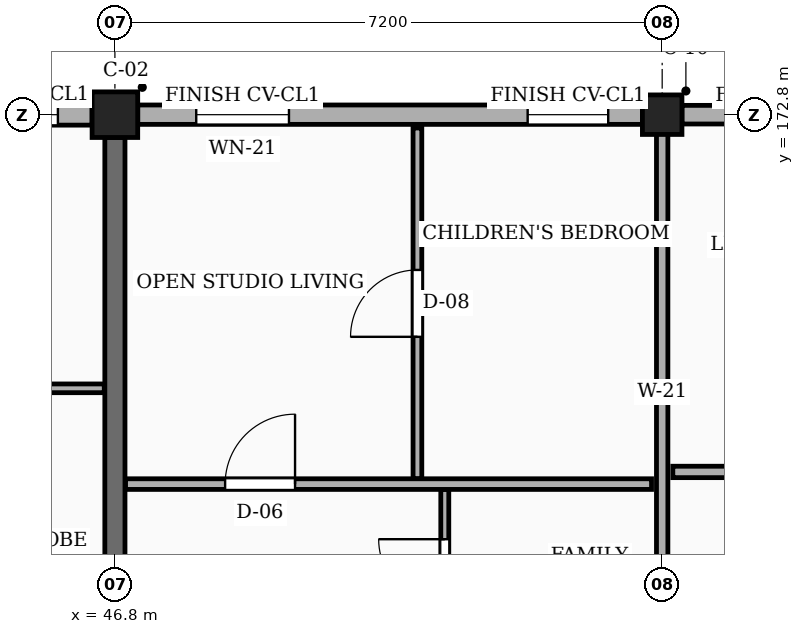
"""IFC4 building model, lengths in metres.
Left out: names, types, materials, properties, quantities, classifications, styles, units other than length and angle.
Written with IfcOpenShell. Run it as: python <this file> out.ifc"""

import sys

from ifc_helpers import new_model, si_unit, direction, frame, frame_2d, origin, origin_2d, place, context, subcontext, project, spatial, rectangle, circle, extrude, element, fill, save


model = new_model("IFC4")
c1 = context("Model", 3, precision=1e-05, world=origin(), true_north=direction((0.0, 1.0)))
c2 = subcontext(c1, "Body", "Model", "MODEL_VIEW")
j1 = project(units=[si_unit("LENGTHUNIT", "METRE"), si_unit("PLANEANGLEUNIT", "RADIAN")], contexts=[c1])
p1 = place(None, origin())
s1 = spatial("IfcSite", under=j1, at=p1, CompositionType="ELEMENT")
p2 = place(p1, origin())
s2 = spatial("IfcBuilding", under=s1, at=p2, CompositionType="ELEMENT")
p3 = place(p2, origin())
s3 = spatial("IfcBuildingStorey", under=s2, at=p3, CompositionType="ELEMENT", Elevation=0.0)
p4 = place(p3, frame((46.8, 172.8, 0.0), z_axis=(0.0, 0.0, 1.0), x_axis=(1.0, 0.0, 0.0)))
e1 = element("IfcColumn", 1, at=p4, inside=s3, PredefinedType="COLUMN", context=c2, shape_type="SweptSolid", body=[
    extrude(rectangle(XDim=0.6, YDim=0.6, at=origin_2d()), origin(), (0.0, 0.0, 1.0), 4.5),
])
p5 = place(p3, frame((54.0, 172.8, 0.0), z_axis=(0.0, 0.0, 1.0), x_axis=(1.0, 0.0, 0.0)))
e2 = element("IfcColumn", 2, at=p5, inside=s3, PredefinedType="COLUMN", context=c2, shape_type="SweptSolid", body=[
    extrude(circle(Radius=0.26, at=origin_2d()), origin(), (0.0, 0.0, 1.0), 4.5),
])
p6 = place(p3, frame((46.8, 165.925, 0.0), z_axis=(0.0, 0.0, 1.0), x_axis=(0.0, 1.0, 0.0)))
e3 = element("IfcWall", 3, at=p6, inside=s3, PredefinedType="SOLIDWALL", context=c2, shape_type="SweptSolid", body=[
    extrude(rectangle(XDim=6.575, YDim=0.265, at=frame_2d((3.288, 0.0))), origin(), (0.0, 0.0, 1.0), 3.535),
])
p7 = place(p3, frame((60.9, 172.8, 0.0), z_axis=(0.0, 0.0, 1.0), x_axis=(-1.0, 0.0, 0.0)))
e4 = element("IfcWall", 4, at=p7, inside=s3, PredefinedType="SOLIDWALL", context=c2, shape_type="SweptSolid", body=[
    extrude(rectangle(XDim=6.64, YDim=0.245, at=frame_2d((3.32, 0.0))), origin(), (0.0, 0.0, 1.0), 3.805),
])
p8 = place(p7, frame((0.45, 0.0, 0.78)))
e5 = element("IfcOpeningElement", 5, at=p8, cuts=e4, PredefinedType="OPENING", context=c2, shape_type="SweptSolid", body=[
    extrude(rectangle(XDim=0.9, YDim=1.36, at=frame_2d((0.45, 0.68))), frame((0.0, 0.133, 0.0), z_axis=(0.0, -1.0, 0.0), x_axis=(1.0, 0.0, 0.0)), (0.0, 0.0, 1.0), 0.265),
])
p9 = place(p7, frame((4.65, 0.0, 0.78)))
e6 = element("IfcOpeningElement", 6, at=p9, cuts=e4, PredefinedType="OPENING", context=c2, shape_type="SweptSolid", body=[
    extrude(rectangle(XDim=1.06, YDim=1.36, at=frame_2d((0.53, 0.68))), frame((0.0, 0.133, 0.0), z_axis=(0.0, -1.0, 0.0), x_axis=(1.0, 0.0, 0.0)), (0.0, 0.0, 1.0), 0.265),
])
p10 = place(p3, frame((53.74, 172.8, 0.0), z_axis=(0.0, 0.0, 1.0), x_axis=(-1.0, 0.0, 0.0)))
e7 = element("IfcWall", 7, at=p10, inside=s3, PredefinedType="SOLIDWALL", context=c2, shape_type="SweptSolid", body=[
    extrude(rectangle(XDim=6.64, YDim=0.255, at=frame_2d((3.32, 0.0))), origin(), (0.0, 0.0, 1.0), 3.805),
])
p11 = place(p10, frame((0.45, 0.0, 0.78)))
e8 = element("IfcOpeningElement", 8, at=p11, cuts=e7, PredefinedType="OPENING", context=c2, shape_type="SweptSolid", body=[
    extrude(rectangle(XDim=1.06, YDim=1.36, at=frame_2d((0.53, 0.68))), frame((0.0, 0.137, 0.0), z_axis=(0.0, -1.0, 0.0), x_axis=(1.0, 0.0, 0.0)), (0.0, 0.0, 1.0), 0.275),
])
p12 = place(p10, frame((4.65, 0.0, 0.78)))
e9 = element("IfcOpeningElement", 9, at=p12, cuts=e7, PredefinedType="OPENING", context=c2, shape_type="SweptSolid", body=[
    extrude(rectangle(XDim=1.22, YDim=1.36, at=frame_2d((0.61, 0.68))), frame((0.0, 0.137, 0.0), z_axis=(0.0, -1.0, 0.0), x_axis=(1.0, 0.0, 0.0)), (0.0, 0.0, 1.0), 0.275),
])
p13 = place(p3, frame((46.5, 172.8, 0.0), z_axis=(0.0, 0.0, 1.0), x_axis=(-1.0, 0.0, 0.0)))
e10 = element("IfcWall", 10, at=p13, inside=s3, PredefinedType="SOLIDWALL", context=c2, shape_type="SweptSolid", body=[
    extrude(rectangle(XDim=6.6, YDim=0.275, at=frame_2d((3.3, 0.0))), origin(), (0.0, 0.0, 1.0), 3.805),
])
p14 = place(p13, frame((0.45, 0.0, 0.78)))
e11 = element("IfcOpeningElement", 11, at=p14, cuts=e10, PredefinedType="OPENING", context=c2, shape_type="SweptSolid", body=[
    extrude(rectangle(XDim=1.22, YDim=1.36, at=frame_2d((0.61, 0.68))), frame((0.0, 0.147, 0.0), z_axis=(0.0, -1.0, 0.0), x_axis=(1.0, 0.0, 0.0)), (0.0, 0.0, 1.0), 0.295),
])
p15 = place(p13, frame((4.65, 0.0, 0.78)))
e12 = element("IfcOpeningElement", 12, at=p15, cuts=e10, PredefinedType="OPENING", context=c2, shape_type="SweptSolid", body=[
    extrude(rectangle(XDim=1.38, YDim=1.36, at=frame_2d((0.69, 0.68))), frame((0.0, 0.147, 0.0), z_axis=(0.0, -1.0, 0.0), x_axis=(1.0, 0.0, 0.0)), (0.0, 0.0, 1.0), 0.295),
])
p16 = place(p3, frame((54.0, 165.69, 0.0), z_axis=(0.0, 0.0, 1.0), x_axis=(0.0, 1.0, 0.0)))
e13 = element("IfcWall", 13, at=p16, inside=s3, PredefinedType="PARTITIONING", context=c2, shape_type="SweptSolid", body=[
    extrude(rectangle(XDim=6.935, YDim=0.15, at=frame_2d((3.468, 0.0))), origin(), (0.0, 0.0, 1.0), 3.485),
])
p17 = place(p3, frame((39.74, 169.2, 0.0), z_axis=(0.0, 0.0, 1.0), x_axis=(1.0, 0.0, 0.0)))
e14 = element("IfcWall", 14, at=p17, inside=s3, PredefinedType="PARTITIONING", context=c2, shape_type="SweptSolid", body=[
    extrude(rectangle(XDim=6.92, YDim=0.115, at=frame_2d((3.46, 0.0))), origin(), (0.0, 0.0, 1.0), 3.67),
])
p18 = place(p17, frame((1.05, 0.0, 0.0)))
e15 = element("IfcOpeningElement", 15, at=p18, cuts=e14, PredefinedType="OPENING", context=c2, shape_type="SweptSolid", body=[
    extrude(rectangle(XDim=0.87, YDim=2.05, at=frame_2d((0.435, 1.025))), frame((0.0, 0.067, 0.0), z_axis=(0.0, -1.0, 0.0), x_axis=(1.0, 0.0, 0.0)), (0.0, 0.0, 1.0), 0.135),
])
p19 = place(p17, frame((4.45, 0.0, 0.0)))
e16 = element("IfcOpeningElement", 16, at=p19, cuts=e14, PredefinedType="OPENING", context=c2, shape_type="SweptSolid", body=[
    extrude(rectangle(XDim=0.88, YDim=2.08, at=frame_2d((0.44, 1.04))), frame((0.0, 0.067, 0.0), z_axis=(0.0, -1.0, 0.0), x_axis=(1.0, 0.0, 0.0)), (0.0, 0.0, 1.0), 0.135),
])
p20 = place(p3, frame((50.78, 168.01, 0.0), z_axis=(0.0, 0.0, 1.0), x_axis=(0.0, 1.0, 0.0)))
e17 = element("IfcWall", 17, at=p20, inside=s3, PredefinedType="PARTITIONING", context=c2, shape_type="SweptSolid", body=[
    extrude(rectangle(XDim=4.615, YDim=0.115, at=frame_2d((2.308, 0.0))), origin(), (0.0, 0.0, 1.0), 3.67),
])
p21 = place(p20, frame((1.867, 0.0, 0.0)))
e18 = element("IfcOpeningElement", 18, at=p21, cuts=e17, PredefinedType="OPENING", context=c2, shape_type="SweptSolid", body=[
    extrude(rectangle(XDim=0.88, YDim=2.08, at=frame_2d((0.44, 1.04))), frame((0.0, 0.067, 0.0), z_axis=(0.0, -1.0, 0.0), x_axis=(1.0, 0.0, 0.0)), (0.0, 0.0, 1.0), 0.135),
])
p22 = place(p3, frame((51.14, 165.69, 0.0), z_axis=(0.0, 0.0, 1.0), x_axis=(0.0, 1.0, 0.0)))
e19 = element("IfcWall", 19, at=p22, inside=s3, PredefinedType="PARTITIONING", context=c2, shape_type="SweptSolid", body=[
    extrude(rectangle(XDim=2.18, YDim=0.105, at=frame_2d((1.09, 0.0))), origin(), (0.0, 0.0, 1.0), 3.67),
])
p23 = place(p22, frame((0.655, 0.0, 0.0)))
e20 = element("IfcOpeningElement", 20, at=p23, cuts=e19, PredefinedType="OPENING", context=c2, shape_type="SweptSolid", body=[
    extrude(rectangle(XDim=0.87, YDim=2.05, at=frame_2d((0.435, 1.025))), frame((0.0, 0.062, 0.0), z_axis=(0.0, -1.0, 0.0), x_axis=(1.0, 0.0, 0.0)), (0.0, 0.0, 1.0), 0.125),
])
p24 = place(p3, frame((46.94, 167.94, 0.0), z_axis=(0.0, 0.0, 1.0), x_axis=(1.0, 0.0, 0.0)))
e21 = element("IfcWall", 21, at=p24, inside=s3, PredefinedType="PARTITIONING", context=c2, shape_type="SweptSolid", body=[
    extrude(rectangle(XDim=6.92, YDim=0.14, at=frame_2d((3.46, 0.0))), origin(), (0.0, 0.0, 1.0), 3.67),
])
p25 = place(p24, frame((1.31, 0.0, 0.0)))
e22 = element("IfcOpeningElement", 22, at=p25, cuts=e21, PredefinedType="OPENING", context=c2, shape_type="SweptSolid", body=[
    extrude(rectangle(XDim=0.92, YDim=2.1, at=frame_2d((0.46, 1.05))), frame((0.0, 0.08, 0.0), z_axis=(0.0, -1.0, 0.0), x_axis=(1.0, 0.0, 0.0)), (0.0, 0.0, 1.0), 0.16),
])
p26 = place(p3, frame((54.14, 168.1, 0.0), z_axis=(0.0, 0.0, 1.0), x_axis=(1.0, 0.0, 0.0)))
e23 = element("IfcWall", 23, at=p26, inside=s3, PredefinedType="PARTITIONING", context=c2, shape_type="SweptSolid", body=[
    extrude(rectangle(XDim=6.92, YDim=0.15, at=frame_2d((3.46, 0.0))), origin(), (0.0, 0.0, 1.0), 3.67),
])
p27 = place(p26, frame((1.31, 0.0, 0.0)))
e24 = element("IfcOpeningElement", 24, at=p27, cuts=e23, PredefinedType="OPENING", context=c2, shape_type="SweptSolid", body=[
    extrude(rectangle(XDim=0.95, YDim=2.1, at=frame_2d((0.475, 1.05))), frame((0.0, 0.085, 0.0), z_axis=(0.0, -1.0, 0.0), x_axis=(1.0, 0.0, 0.0)), (0.0, 0.0, 1.0), 0.17),
])
p28 = place(p11, origin())
e25 = element("IfcWindow", 25, at=p28, inside=s3, PartitioningType="SINGLE_PANEL", PredefinedType="WINDOW", context=c2, shape_type="SweptSolid", body=[
    extrude(rectangle(XDim=1.06, YDim=1.36, at=frame_2d((0.53, 0.68))), frame((0.0, 0.03, 0.0), z_axis=(0.0, -1.0, 0.0), x_axis=(1.0, 0.0, 0.0)), (0.0, 0.0, 1.0), 0.06),
])
fill(e8, e25)
p29 = place(p12, origin())
e26 = element("IfcWindow", 26, at=p29, inside=s3, PartitioningType="SINGLE_PANEL", PredefinedType="WINDOW", context=c2, shape_type="SweptSolid", body=[
    extrude(rectangle(XDim=1.22, YDim=1.36, at=frame_2d((0.61, 0.68))), frame((0.0, 0.03, 0.0), z_axis=(0.0, -1.0, 0.0), x_axis=(1.0, 0.0, 0.0)), (0.0, 0.0, 1.0), 0.06),
])
fill(e9, e26)
p30 = place(p14, origin())
e27 = element("IfcWindow", 27, at=p30, inside=s3, PartitioningType="SINGLE_PANEL", PredefinedType="WINDOW", context=c2, shape_type="SweptSolid", body=[
    extrude(rectangle(XDim=1.22, YDim=1.36, at=frame_2d((0.61, 0.68))), frame((0.0, 0.03, 0.0), z_axis=(0.0, -1.0, 0.0), x_axis=(1.0, 0.0, 0.0)), (0.0, 0.0, 1.0), 0.06),
])
fill(e11, e27)
p31 = place(p21, origin())
e28 = element("IfcDoor", 28, at=p31, inside=s3, OperationType="SINGLE_SWING_LEFT", PredefinedType="DOOR", context=c2, shape_type="SweptSolid", body=[
    extrude(rectangle(XDim=0.88, YDim=2.08, at=frame_2d((0.44, 1.04))), frame((0.0, 0.025, 0.0), z_axis=(0.0, -1.0, 0.0), x_axis=(1.0, 0.0, 0.0)), (0.0, 0.0, 1.0), 0.05),
])
fill(e18, e28)
p32 = place(p23, origin())
e29 = element("IfcDoor", 29, at=p32, inside=s3, OperationType="SINGLE_SWING_RIGHT", PredefinedType="DOOR", context=c2, shape_type="SweptSolid", body=[
    extrude(rectangle(XDim=0.87, YDim=2.05, at=frame_2d((0.435, 1.025))), frame((0.0, 0.025, 0.0), z_axis=(0.0, -1.0, 0.0), x_axis=(1.0, 0.0, 0.0)), (0.0, 0.0, 1.0), 0.05),
])
fill(e20, e29)
p33 = place(p25, origin())
e30 = element("IfcDoor", 30, at=p33, inside=s3, OperationType="SINGLE_SWING_RIGHT", PredefinedType="DOOR", context=c2, shape_type="SweptSolid", body=[
    extrude(rectangle(XDim=0.92, YDim=2.1, at=frame_2d((0.46, 1.05))), frame((0.0, 0.025, 0.0), z_axis=(0.0, -1.0, 0.0), x_axis=(1.0, 0.0, 0.0)), (0.0, 0.0, 1.0), 0.05),
])
fill(e22, e30)
save(model, sys.argv[1])
